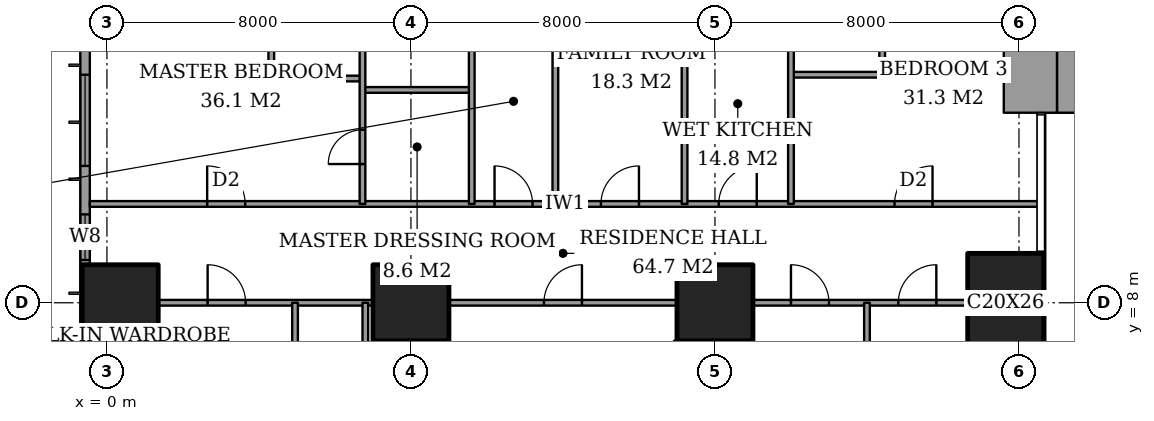
"""IFC4 building model, lengths in metres.
Left out: names, types, materials, properties, quantities, classifications, styles, units other than length and angle.
Written with IfcOpenShell. Run it as: python <this file> out.ifc"""

import sys

from ifc_helpers import new_model, si_unit, direction, frame, frame_2d, origin, origin_2d, place, context, subcontext, project, spatial, rectangle, extrude, element, fill, save


model = new_model("IFC4")
c1 = context("Model", 3, precision=1e-05, world=origin(), true_north=direction((0.0, 1.0)))
c2 = subcontext(c1, "Body", "Model", "MODEL_VIEW")
j1 = project(units=[si_unit("LENGTHUNIT", "METRE"), si_unit("PLANEANGLEUNIT", "RADIAN")], contexts=[c1])
p1 = place(None, origin())
s1 = spatial("IfcSite", under=j1, at=p1, CompositionType="ELEMENT")
p2 = place(p1, origin())
s2 = spatial("IfcBuilding", under=s1, at=p2, CompositionType="ELEMENT")
p3 = place(p2, frame((0.0, 0.0, 83.6)))
s3 = spatial("IfcBuildingStorey", under=s2, at=p3, CompositionType="ELEMENT", Elevation=83.6)
for number, where, z_axis, x_axis in (
    (1, (0.35, 8.0, 0.0), (0.0, 0.0, 1.0), (1.0, 0.0, 0.0)),
    (2, (8.0, 8.0, 0.0), (0.0, 0.0, 1.0), (1.0, 0.0, 0.0)),
    (3, (16.0, 8.0, 0.0), (0.0, 0.0, 1.0), (1.0, 0.0, 0.0)),
):
    element("IfcColumn", number, at=place(p3, frame(where, z_axis=z_axis, x_axis=x_axis)), inside=s3, PredefinedType="COLUMN", context=c2, shape_type="SweptSolid", body=[
        extrude(rectangle(XDim=2.0, YDim=2.0, at=origin_2d()), origin(), (0.0, 0.0, 1.0), 3.6),
    ])
p4 = place(p3, frame((23.65, 8.0, 0.0), z_axis=(0.0, 0.0, 1.0), x_axis=(1.0, 0.0, 0.0)))
e4 = element("IfcColumn", 4, at=p4, inside=s3, PredefinedType="COLUMN", context=c2, shape_type="SweptSolid", body=[
    extrude(rectangle(XDim=2.0, YDim=2.6, at=origin_2d()), origin(), (0.0, 0.0, 1.0), 3.6),
])
p5 = place(p3, frame((25.0, 14.0, 0.0), z_axis=(0.0, 0.0, 1.0), x_axis=(1.0, 0.0, 0.0)))
e5 = element("IfcWall", 5, at=p5, inside=s3, PredefinedType="SHEAR", context=c2, shape_type="SweptSolid", body=[
    extrude(rectangle(XDim=3.15, YDim=2.0, at=frame_2d((1.575, 0.0))), origin(), (0.0, 0.0, 1.0), 3.6),
])
p6 = place(p3, frame((24.3, 13.0, 0.0), z_axis=(0.0, 0.0, 1.0), x_axis=(0.0, 1.0, 0.0)))
e6 = element("IfcWall", 6, at=p6, inside=s3, PredefinedType="SHEAR", context=c2, shape_type="SweptSolid", body=[
    extrude(rectangle(XDim=10.15, YDim=1.4, at=frame_2d((5.075, 0.0))), origin(), (0.0, 0.0, 1.0), 3.6),
])
p7 = place(p3, frame((-0.575, 44.825, 0.0), z_axis=(0.0, 0.0, 1.0), x_axis=(0.0, -1.0, 0.0)))
e7 = element("IfcWall", 7, at=p7, inside=s3, PredefinedType="SOLIDWALL", context=c2, shape_type="SweptSolid", body=[
    extrude(rectangle(XDim=41.65, YDim=0.25, at=frame_2d((20.825, 0.0))), origin(), (0.0, 0.0, 1.0), 3.6),
])
p8 = place(p7, frame((0.775, 0.0, 0.6)))
e8 = element("IfcOpeningElement", 8, at=p8, cuts=e7, PredefinedType="OPENING", context=c2, shape_type="SweptSolid", body=[
    extrude(rectangle(XDim=2.4, YDim=2.0, at=frame_2d((1.2, 1.0))), frame((0.0, 0.135, 0.0), z_axis=(0.0, -1.0, 0.0), x_axis=(1.0, 0.0, 0.0)), (0.0, 0.0, 1.0), 0.27),
])
p9 = place(p7, frame((6.1, 0.0, 0.6)))
e9 = element("IfcOpeningElement", 9, at=p9, cuts=e7, PredefinedType="OPENING", context=c2, shape_type="SweptSolid", body=[
    extrude(rectangle(XDim=1.2, YDim=2.0, at=frame_2d((0.6, 1.0))), frame((0.0, 0.135, 0.0), z_axis=(0.0, -1.0, 0.0), x_axis=(1.0, 0.0, 0.0)), (0.0, 0.0, 1.0), 0.27),
])
p10 = place(p7, frame((8.425, 0.0, 0.6)))
e10 = element("IfcOpeningElement", 10, at=p10, cuts=e7, PredefinedType="OPENING", context=c2, shape_type="SweptSolid", body=[
    extrude(rectangle(XDim=2.4, YDim=2.0, at=frame_2d((1.2, 1.0))), frame((0.0, 0.135, 0.0), z_axis=(0.0, -1.0, 0.0), x_axis=(1.0, 0.0, 0.0)), (0.0, 0.0, 1.0), 0.27),
])
p11 = place(p7, frame((15.625, 0.0, 0.6)))
e11 = element("IfcOpeningElement", 11, at=p11, cuts=e7, PredefinedType="OPENING", context=c2, shape_type="SweptSolid", body=[
    extrude(rectangle(XDim=2.4, YDim=2.0, at=frame_2d((1.2, 1.0))), frame((0.0, 0.135, 0.0), z_axis=(0.0, -1.0, 0.0), x_axis=(1.0, 0.0, 0.0)), (0.0, 0.0, 1.0), 0.27),
])
p12 = place(p7, frame((23.625, 0.0, 0.6)))
e12 = element("IfcOpeningElement", 12, at=p12, cuts=e7, PredefinedType="OPENING", context=c2, shape_type="SweptSolid", body=[
    extrude(rectangle(XDim=2.4, YDim=2.0, at=frame_2d((1.2, 1.0))), frame((0.0, 0.135, 0.0), z_axis=(0.0, -1.0, 0.0), x_axis=(1.0, 0.0, 0.0)), (0.0, 0.0, 1.0), 0.27),
])
p13 = place(p7, frame((30.825, 0.0, 0.6)))
e13 = element("IfcOpeningElement", 13, at=p13, cuts=e7, PredefinedType="OPENING", context=c2, shape_type="SweptSolid", body=[
    extrude(rectangle(XDim=2.4, YDim=2.0, at=frame_2d((1.2, 1.0))), frame((0.0, 0.135, 0.0), z_axis=(0.0, -1.0, 0.0), x_axis=(1.0, 0.0, 0.0)), (0.0, 0.0, 1.0), 0.27),
])
p14 = place(p7, frame((34.5, 0.0, 0.6)))
e14 = element("IfcOpeningElement", 14, at=p14, cuts=e7, PredefinedType="OPENING", context=c2, shape_type="SweptSolid", body=[
    extrude(rectangle(XDim=1.2, YDim=2.0, at=frame_2d((0.6, 1.0))), frame((0.0, 0.135, 0.0), z_axis=(0.0, -1.0, 0.0), x_axis=(1.0, 0.0, 0.0)), (0.0, 0.0, 1.0), 0.27),
])
p15 = place(p7, frame((38.475, 0.0, 0.6)))
e15 = element("IfcOpeningElement", 15, at=p15, cuts=e7, PredefinedType="OPENING", context=c2, shape_type="SweptSolid", body=[
    extrude(rectangle(XDim=2.4, YDim=2.0, at=frame_2d((1.2, 1.0))), frame((0.0, 0.135, 0.0), z_axis=(0.0, -1.0, 0.0), x_axis=(1.0, 0.0, 0.0)), (0.0, 0.0, 1.0), 0.27),
])
p16 = place(p3, frame((1.35, 8.0, 0.0), z_axis=(0.0, 0.0, 1.0), x_axis=(1.0, 0.0, 0.0)))
e16 = element("IfcWall", 16, at=p16, inside=s3, PredefinedType="PARTITIONING", context=c2, shape_type="SweptSolid", body=[
    extrude(rectangle(XDim=5.65, YDim=0.15, at=frame_2d((2.825, 0.0))), origin(), (0.0, 0.0, 1.0), 3.35),
])
p17 = place(p16, frame((1.3, 0.0, 0.0)))
e17 = element("IfcOpeningElement", 17, at=p17, cuts=e16, PredefinedType="OPENING", context=c2, shape_type="SweptSolid", body=[
    extrude(rectangle(XDim=1.0, YDim=2.1, at=frame_2d((0.5, 1.05))), frame((0.0, 0.085, 0.0), z_axis=(0.0, -1.0, 0.0), x_axis=(1.0, 0.0, 0.0)), (0.0, 0.0, 1.0), 0.17),
])
p18 = place(p3, frame((9.0, 8.0, 0.0), z_axis=(0.0, 0.0, 1.0), x_axis=(1.0, 0.0, 0.0)))
e18 = element("IfcWall", 18, at=p18, inside=s3, PredefinedType="PARTITIONING", context=c2, shape_type="SweptSolid", body=[
    extrude(rectangle(XDim=6.0, YDim=0.15, at=frame_2d((3.0, 0.0))), origin(), (0.0, 0.0, 1.0), 3.35),
])
p19 = place(p18, frame((2.5, 0.0, 0.0)))
e19 = element("IfcOpeningElement", 19, at=p19, cuts=e18, PredefinedType="OPENING", context=c2, shape_type="SweptSolid", body=[
    extrude(rectangle(XDim=1.0, YDim=2.1, at=frame_2d((0.5, 1.05))), frame((0.0, 0.085, 0.0), z_axis=(0.0, -1.0, 0.0), x_axis=(1.0, 0.0, 0.0)), (0.0, 0.0, 1.0), 0.17),
])
p20 = place(p3, frame((17.0, 8.0, 0.0), z_axis=(0.0, 0.0, 1.0), x_axis=(1.0, 0.0, 0.0)))
e20 = element("IfcWall", 20, at=p20, inside=s3, PredefinedType="PARTITIONING", context=c2, shape_type="SweptSolid", body=[
    extrude(rectangle(XDim=5.65, YDim=0.15, at=frame_2d((2.825, 0.0))), origin(), (0.0, 0.0, 1.0), 3.35),
])
p21 = place(p20, frame((1.0, 0.0, 0.0)))
e21 = element("IfcOpeningElement", 21, at=p21, cuts=e20, PredefinedType="OPENING", context=c2, shape_type="SweptSolid", body=[
    extrude(rectangle(XDim=1.0, YDim=2.1, at=frame_2d((0.5, 1.05))), frame((0.0, 0.085, 0.0), z_axis=(0.0, -1.0, 0.0), x_axis=(1.0, 0.0, 0.0)), (0.0, 0.0, 1.0), 0.17),
])
p22 = place(p20, frame((3.825, 0.0, 0.0)))
e22 = element("IfcOpeningElement", 22, at=p22, cuts=e20, PredefinedType="OPENING", context=c2, shape_type="SweptSolid", body=[
    extrude(rectangle(XDim=1.0, YDim=2.1, at=frame_2d((0.5, 1.05))), frame((0.0, 0.085, 0.0), z_axis=(0.0, -1.0, 0.0), x_axis=(1.0, 0.0, 0.0)), (0.0, 0.0, 1.0), 0.17),
])
p23 = place(p3, frame((-0.45, 10.6, 0.0), z_axis=(0.0, 0.0, 1.0), x_axis=(1.0, 0.0, 0.0)))
e23 = element("IfcWall", 23, at=p23, inside=s3, PredefinedType="PARTITIONING", context=c2, shape_type="SweptSolid", body=[
    extrude(rectangle(XDim=25.011, YDim=0.15, at=frame_2d((12.505, 0.0))), origin(), (0.0, 0.0, 1.0), 3.35),
])
p24 = place(p23, frame((10.65, 0.0, 0.0)))
e24 = element("IfcOpeningElement", 24, at=p24, cuts=e23, PredefinedType="OPENING", context=c2, shape_type="SweptSolid", body=[
    extrude(rectangle(XDim=1.0, YDim=2.1, at=frame_2d((0.5, 1.05))), frame((0.0, 0.085, 0.0), z_axis=(0.0, -1.0, 0.0), x_axis=(1.0, 0.0, 0.0)), (0.0, 0.0, 1.0), 0.17),
])
p25 = place(p23, frame((3.087, 0.0, 0.0)))
e25 = element("IfcOpeningElement", 25, at=p25, cuts=e23, PredefinedType="OPENING", context=c2, shape_type="SweptSolid", body=[
    extrude(rectangle(XDim=1.0, YDim=2.1, at=frame_2d((0.5, 1.05))), frame((0.0, 0.085, 0.0), z_axis=(0.0, -1.0, 0.0), x_axis=(1.0, 0.0, 0.0)), (0.0, 0.0, 1.0), 0.17),
])
p26 = place(p23, frame((13.45, 0.0, 0.0)))
e26 = element("IfcOpeningElement", 26, at=p26, cuts=e23, PredefinedType="OPENING", context=c2, shape_type="SweptSolid", body=[
    extrude(rectangle(XDim=1.0, YDim=2.1, at=frame_2d((0.5, 1.05))), frame((0.0, 0.085, 0.0), z_axis=(0.0, -1.0, 0.0), x_axis=(1.0, 0.0, 0.0)), (0.0, 0.0, 1.0), 0.17),
])
p27 = place(p23, frame((16.55, 0.0, 0.0)))
e27 = element("IfcOpeningElement", 27, at=p27, cuts=e23, PredefinedType="OPENING", context=c2, shape_type="SweptSolid", body=[
    extrude(rectangle(XDim=1.0, YDim=2.1, at=frame_2d((0.5, 1.05))), frame((0.0, 0.085, 0.0), z_axis=(0.0, -1.0, 0.0), x_axis=(1.0, 0.0, 0.0)), (0.0, 0.0, 1.0), 0.17),
])
p28 = place(p23, frame((21.175, 0.0, 0.0)))
e28 = element("IfcOpeningElement", 28, at=p28, cuts=e23, PredefinedType="OPENING", context=c2, shape_type="SweptSolid", body=[
    extrude(rectangle(XDim=1.0, YDim=2.1, at=frame_2d((0.5, 1.05))), frame((0.0, 0.085, 0.0), z_axis=(0.0, -1.0, 0.0), x_axis=(1.0, 0.0, 0.0)), (0.0, 0.0, 1.0), 0.17),
])
p29 = place(p3, frame((6.725, 13.6, 0.0), z_axis=(0.0, 0.0, 1.0), x_axis=(1.0, 0.0, 0.0)))
e29 = element("IfcWall", 29, at=p29, inside=s3, PredefinedType="PARTITIONING", context=c2, shape_type="SweptSolid", body=[
    extrude(rectangle(XDim=2.875, YDim=0.15, at=frame_2d((1.438, 0.0))), origin(), (0.0, 0.0, 1.0), 3.35),
])
p30 = place(p3, frame((4.325, 13.9, 0.0), z_axis=(0.0, 0.0, 1.0), x_axis=(1.0, 0.0, 0.0)))
e30 = element("IfcWall", 30, at=p30, inside=s3, PredefinedType="PARTITIONING", context=c2, shape_type="SweptSolid", body=[
    extrude(rectangle(XDim=2.4, YDim=0.15, at=frame_2d((1.2, 0.0))), origin(), (0.0, 0.0, 1.0), 3.35),
])
p31 = place(p3, frame((18.0, 14.0, 0.0), z_axis=(0.0, 0.0, 1.0), x_axis=(1.0, 0.0, 0.0)))
e31 = element("IfcWall", 31, at=p31, inside=s3, PredefinedType="PARTITIONING", context=c2, shape_type="SweptSolid", body=[
    extrude(rectangle(XDim=2.4, YDim=0.15, at=frame_2d((1.2, 0.0))), origin(), (0.0, 0.0, 1.0), 3.35),
])
p32 = place(p3, frame((1.25, 3.3, 0.0), z_axis=(0.0, 0.0, 1.0), x_axis=(0.0, 1.0, 0.0)))
e32 = element("IfcWall", 32, at=p32, inside=s3, PredefinedType="PARTITIONING", context=c2, shape_type="SweptSolid", body=[
    extrude(rectangle(XDim=3.7, YDim=0.15, at=frame_2d((1.85, 0.0))), origin(), (0.0, 0.0, 1.0), 3.35),
])
p33 = place(p32, frame((1.4, 0.0, 0.0)))
e33 = element("IfcOpeningElement", 33, at=p33, cuts=e32, PredefinedType="OPENING", context=c2, shape_type="SweptSolid", body=[
    extrude(rectangle(XDim=0.9, YDim=2.1, at=frame_2d((0.45, 1.05))), frame((0.0, 0.085, 0.0), z_axis=(0.0, -1.0, 0.0), x_axis=(1.0, 0.0, 0.0)), (0.0, 0.0, 1.0), 0.17),
])
p34 = place(p3, frame((4.325, 13.9, 0.0), z_axis=(0.0, 0.0, 1.0), x_axis=(0.0, 1.0, 0.0)))
e34 = element("IfcWall", 34, at=p34, inside=s3, PredefinedType="PARTITIONING", context=c2, shape_type="SweptSolid", body=[
    extrude(rectangle(XDim=2.6, YDim=0.15, at=frame_2d((1.3, 0.0))), origin(), (0.0, 0.0, 1.0), 3.35),
])
p35 = place(p34, frame((0.85, 0.0, 0.0)))
e35 = element("IfcOpeningElement", 35, at=p35, cuts=e34, PredefinedType="OPENING", context=c2, shape_type="SweptSolid", body=[
    extrude(rectangle(XDim=0.9, YDim=2.1, at=frame_2d((0.45, 1.05))), frame((0.0, 0.085, 0.0), z_axis=(0.0, -1.0, 0.0), x_axis=(1.0, 0.0, 0.0)), (0.0, 0.0, 1.0), 0.17),
])
p36 = place(p3, frame((4.95, -0.45, 0.0), z_axis=(0.0, 0.0, 1.0), x_axis=(0.0, 1.0, 0.0)))
e36 = element("IfcWall", 36, at=p36, inside=s3, PredefinedType="PARTITIONING", context=c2, shape_type="SweptSolid", body=[
    extrude(rectangle(XDim=8.45, YDim=0.15, at=frame_2d((4.225, 0.0))), origin(), (0.0, 0.0, 1.0), 3.35),
])
p37 = place(p36, frame((3.775, 0.0, 0.0)))
e37 = element("IfcOpeningElement", 37, at=p37, cuts=e36, PredefinedType="OPENING", context=c2, shape_type="SweptSolid", body=[
    extrude(rectangle(XDim=0.9, YDim=2.1, at=frame_2d((0.45, 1.05))), frame((0.0, 0.085, 0.0), z_axis=(0.0, -1.0, 0.0), x_axis=(1.0, 0.0, 0.0)), (0.0, 0.0, 1.0), 0.17),
])
p38 = place(p3, frame((6.725, 10.6, 0.0), z_axis=(0.0, 0.0, 1.0), x_axis=(0.0, 1.0, 0.0)))
e38 = element("IfcWall", 38, at=p38, inside=s3, PredefinedType="PARTITIONING", context=c2, shape_type="SweptSolid", body=[
    extrude(rectangle(XDim=4.2, YDim=0.15, at=frame_2d((2.1, 0.0))), origin(), (0.0, 0.0, 1.0), 3.35),
])
p39 = place(p38, frame((1.05, 0.0, 0.0)))
e39 = element("IfcOpeningElement", 39, at=p39, cuts=e38, PredefinedType="OPENING", context=c2, shape_type="SweptSolid", body=[
    extrude(rectangle(XDim=0.9, YDim=2.1, at=frame_2d((0.45, 1.05))), frame((0.0, 0.085, 0.0), z_axis=(0.0, -1.0, 0.0), x_axis=(1.0, 0.0, 0.0)), (0.0, 0.0, 1.0), 0.17),
])
p40 = place(p3, frame((6.8, -0.45, 0.0), z_axis=(0.0, 0.0, 1.0), x_axis=(0.0, 1.0, 0.0)))
e40 = element("IfcWall", 40, at=p40, inside=s3, PredefinedType="PARTITIONING", context=c2, shape_type="SweptSolid", body=[
    extrude(rectangle(XDim=8.45, YDim=0.15, at=frame_2d((4.225, 0.0))), origin(), (0.0, 0.0, 1.0), 3.35),
])
p41 = place(p3, frame((9.6, 10.6, 0.0), z_axis=(0.0, 0.0, 1.0), x_axis=(0.0, 1.0, 0.0)))
e41 = element("IfcWall", 41, at=p41, inside=s3, PredefinedType="PARTITIONING", context=c2, shape_type="SweptSolid", body=[
    extrude(rectangle(XDim=11.0, YDim=0.15, at=frame_2d((5.5, 0.0))), origin(), (0.0, 0.0, 1.0), 3.35),
])
p42 = place(p41, frame((7.7, 0.0, 0.0)))
e42 = element("IfcOpeningElement", 42, at=p42, cuts=e41, PredefinedType="OPENING", context=c2, shape_type="SweptSolid", body=[
    extrude(rectangle(XDim=1.0, YDim=2.1, at=frame_2d((0.5, 1.05))), frame((0.0, 0.085, 0.0), z_axis=(0.0, -1.0, 0.0), x_axis=(1.0, 0.0, 0.0)), (0.0, 0.0, 1.0), 0.17),
])
p43 = place(p3, frame((11.8, 10.6, 0.0), z_axis=(0.0, 0.0, 1.0), x_axis=(0.0, 1.0, 0.0)))
e43 = element("IfcWall", 43, at=p43, inside=s3, PredefinedType="PARTITIONING", context=c2, shape_type="SweptSolid", body=[
    extrude(rectangle(XDim=5.4, YDim=0.15, at=frame_2d((2.7, 0.0))), origin(), (0.0, 0.0, 1.0), 3.35),
])
p44 = place(p3, frame((15.2, 10.6, 0.0), z_axis=(0.0, 0.0, 1.0), x_axis=(0.0, 1.0, 0.0)))
e44 = element("IfcWall", 44, at=p44, inside=s3, PredefinedType="PARTITIONING", context=c2, shape_type="SweptSolid", body=[
    extrude(rectangle(XDim=4.2, YDim=0.15, at=frame_2d((2.1, 0.0))), origin(), (0.0, 0.0, 1.0), 3.35),
])
p45 = place(p3, frame((18.0, 10.6, 0.0), z_axis=(0.0, 0.0, 1.0), x_axis=(0.0, 1.0, 0.0)))
e45 = element("IfcWall", 45, at=p45, inside=s3, PredefinedType="PARTITIONING", context=c2, shape_type="SweptSolid", body=[
    extrude(rectangle(XDim=13.4, YDim=0.15, at=frame_2d((6.7, 0.0))), origin(), (0.0, 0.0, 1.0), 3.35),
])
p46 = place(p45, frame((10.8, 0.0, 0.0)))
e46 = element("IfcOpeningElement", 46, at=p46, cuts=e45, PredefinedType="OPENING", context=c2, shape_type="SweptSolid", body=[
    extrude(rectangle(XDim=1.2, YDim=2.4, at=frame_2d((0.6, 1.2))), frame((0.0, 0.085, 0.0), z_axis=(0.0, -1.0, 0.0), x_axis=(1.0, 0.0, 0.0)), (0.0, 0.0, 1.0), 0.17),
])
p47 = place(p45, frame((7.25, 0.0, 0.0)))
e47 = element("IfcOpeningElement", 47, at=p47, cuts=e45, PredefinedType="OPENING", context=c2, shape_type="SweptSolid", body=[
    extrude(rectangle(XDim=0.9, YDim=2.1, at=frame_2d((0.45, 1.05))), frame((0.0, 0.085, 0.0), z_axis=(0.0, -1.0, 0.0), x_axis=(1.0, 0.0, 0.0)), (0.0, 0.0, 1.0), 0.17),
])
p48 = place(p3, frame((20.0, -0.45, 0.0), z_axis=(0.0, 0.0, 1.0), x_axis=(0.0, 1.0, 0.0)))
e48 = element("IfcWall", 48, at=p48, inside=s3, PredefinedType="PARTITIONING", context=c2, shape_type="SweptSolid", body=[
    extrude(rectangle(XDim=8.45, YDim=0.15, at=frame_2d((4.225, 0.0))), origin(), (0.0, 0.0, 1.0), 3.35),
])
p49 = place(p3, frame((20.4, 14.0, 0.0), z_axis=(0.0, 0.0, 1.0), x_axis=(0.0, 1.0, 0.0)))
e49 = element("IfcWall", 49, at=p49, inside=s3, PredefinedType="PARTITIONING", context=c2, shape_type="SweptSolid", body=[
    extrude(rectangle(XDim=2.6, YDim=0.15, at=frame_2d((1.3, 0.0))), origin(), (0.0, 0.0, 1.0), 3.35),
])
p50 = place(p49, frame((0.85, 0.0, 0.0)))
e50 = element("IfcOpeningElement", 50, at=p50, cuts=e49, PredefinedType="OPENING", context=c2, shape_type="SweptSolid", body=[
    extrude(rectangle(XDim=0.9, YDim=2.1, at=frame_2d((0.45, 1.05))), frame((0.0, 0.085, 0.0), z_axis=(0.0, -1.0, 0.0), x_axis=(1.0, 0.0, 0.0)), (0.0, 0.0, 1.0), 0.17),
])
p51 = place(p13, origin())
e51 = element("IfcWindow", 51, at=p51, inside=s3, PartitioningType="SINGLE_PANEL", PredefinedType="WINDOW", context=c2, shape_type="SweptSolid", body=[
    extrude(rectangle(XDim=2.4, YDim=2.0, at=frame_2d((1.2, 1.0))), frame((0.0, 0.03, 0.0), z_axis=(0.0, -1.0, 0.0), x_axis=(1.0, 0.0, 0.0)), (0.0, 0.0, 1.0), 0.06),
])
fill(e13, e51)
p52 = place(p14, origin())
e52 = element("IfcWindow", 52, at=p52, inside=s3, PartitioningType="SINGLE_PANEL", PredefinedType="WINDOW", context=c2, shape_type="SweptSolid", body=[
    extrude(rectangle(XDim=1.2, YDim=2.0, at=frame_2d((0.6, 1.0))), frame((0.0, 0.03, 0.0), z_axis=(0.0, -1.0, 0.0), x_axis=(1.0, 0.0, 0.0)), (0.0, 0.0, 1.0), 0.06),
])
fill(e14, e52)
p53 = place(p17, origin())
e53 = element("IfcDoor", 53, at=p53, inside=s3, OperationType="SINGLE_SWING_RIGHT", PredefinedType="DOOR", context=c2, shape_type="SweptSolid", body=[
    extrude(rectangle(XDim=1.0, YDim=2.1, at=frame_2d((0.5, 1.05))), frame((0.0, 0.025, 0.0), z_axis=(0.0, -1.0, 0.0), x_axis=(1.0, 0.0, 0.0)), (0.0, 0.0, 1.0), 0.05),
])
fill(e17, e53)
p54 = place(p19, origin())
e54 = element("IfcDoor", 54, at=p54, inside=s3, OperationType="SINGLE_SWING_LEFT", PredefinedType="DOOR", context=c2, shape_type="SweptSolid", body=[
    extrude(rectangle(XDim=1.0, YDim=2.1, at=frame_2d((0.5, 1.05))), frame((0.0, 0.025, 0.0), z_axis=(0.0, -1.0, 0.0), x_axis=(1.0, 0.0, 0.0)), (0.0, 0.0, 1.0), 0.05),
])
fill(e19, e54)
p55 = place(p21, origin())
e55 = element("IfcDoor", 55, at=p55, inside=s3, OperationType="SINGLE_SWING_RIGHT", PredefinedType="DOOR", context=c2, shape_type="SweptSolid", body=[
    extrude(rectangle(XDim=1.0, YDim=2.1, at=frame_2d((0.5, 1.05))), frame((0.0, 0.025, 0.0), z_axis=(0.0, -1.0, 0.0), x_axis=(1.0, 0.0, 0.0)), (0.0, 0.0, 1.0), 0.05),
])
fill(e21, e55)
p56 = place(p22, origin())
e56 = element("IfcDoor", 56, at=p56, inside=s3, OperationType="SINGLE_SWING_LEFT", PredefinedType="DOOR", context=c2, shape_type="SweptSolid", body=[
    extrude(rectangle(XDim=1.0, YDim=2.1, at=frame_2d((0.5, 1.05))), frame((0.0, 0.025, 0.0), z_axis=(0.0, -1.0, 0.0), x_axis=(1.0, 0.0, 0.0)), (0.0, 0.0, 1.0), 0.05),
])
fill(e22, e56)
p57 = place(p24, origin())
e57 = element("IfcDoor", 57, at=p57, inside=s3, OperationType="SINGLE_SWING_RIGHT", PredefinedType="DOOR", context=c2, shape_type="SweptSolid", body=[
    extrude(rectangle(XDim=1.0, YDim=2.1, at=frame_2d((0.5, 1.05))), frame((0.0, 0.025, 0.0), z_axis=(0.0, -1.0, 0.0), x_axis=(1.0, 0.0, 0.0)), (0.0, 0.0, 1.0), 0.05),
])
fill(e24, e57)
p58 = place(p25, origin())
e58 = element("IfcDoor", 58, at=p58, inside=s3, OperationType="SINGLE_SWING_RIGHT", PredefinedType="DOOR", context=c2, shape_type="SweptSolid", body=[
    extrude(rectangle(XDim=1.0, YDim=2.1, at=frame_2d((0.5, 1.05))), frame((0.0, 0.025, 0.0), z_axis=(0.0, -1.0, 0.0), x_axis=(1.0, 0.0, 0.0)), (0.0, 0.0, 1.0), 0.05),
])
fill(e25, e58)
p59 = place(p39, origin())
e59 = element("IfcDoor", 59, at=p59, inside=s3, OperationType="SINGLE_SWING_RIGHT", PredefinedType="DOOR", context=c2, shape_type="SweptSolid", body=[
    extrude(rectangle(XDim=0.9, YDim=2.1, at=frame_2d((0.45, 1.05))), frame((0.0, 0.025, 0.0), z_axis=(0.0, -1.0, 0.0), x_axis=(1.0, 0.0, 0.0)), (0.0, 0.0, 1.0), 0.05),
])
fill(e39, e59)
p60 = place(p26, origin())
e60 = element("IfcDoor", 60, at=p60, inside=s3, OperationType="SINGLE_SWING_LEFT", PredefinedType="DOOR", context=c2, shape_type="SweptSolid", body=[
    extrude(rectangle(XDim=1.0, YDim=2.1, at=frame_2d((0.5, 1.05))), frame((0.0, 0.025, 0.0), z_axis=(0.0, -1.0, 0.0), x_axis=(1.0, 0.0, 0.0)), (0.0, 0.0, 1.0), 0.05),
])
fill(e26, e60)
p61 = place(p27, origin())
e61 = element("IfcDoor", 61, at=p61, inside=s3, OperationType="SINGLE_SWING_LEFT", PredefinedType="DOOR", context=c2, shape_type="SweptSolid", body=[
    extrude(rectangle(XDim=1.0, YDim=2.1, at=frame_2d((0.5, 1.05))), frame((0.0, 0.025, 0.0), z_axis=(0.0, -1.0, 0.0), x_axis=(1.0, 0.0, 0.0)), (0.0, 0.0, 1.0), 0.05),
])
fill(e27, e61)
p62 = place(p28, origin())
e62 = element("IfcDoor", 62, at=p62, inside=s3, OperationType="SINGLE_SWING_LEFT", PredefinedType="DOOR", context=c2, shape_type="SweptSolid", body=[
    extrude(rectangle(XDim=1.0, YDim=2.1, at=frame_2d((0.5, 1.05))), frame((0.0, 0.025, 0.0), z_axis=(0.0, -1.0, 0.0), x_axis=(1.0, 0.0, 0.0)), (0.0, 0.0, 1.0), 0.05),
])
fill(e28, e62)
save(model, sys.argv[1])
